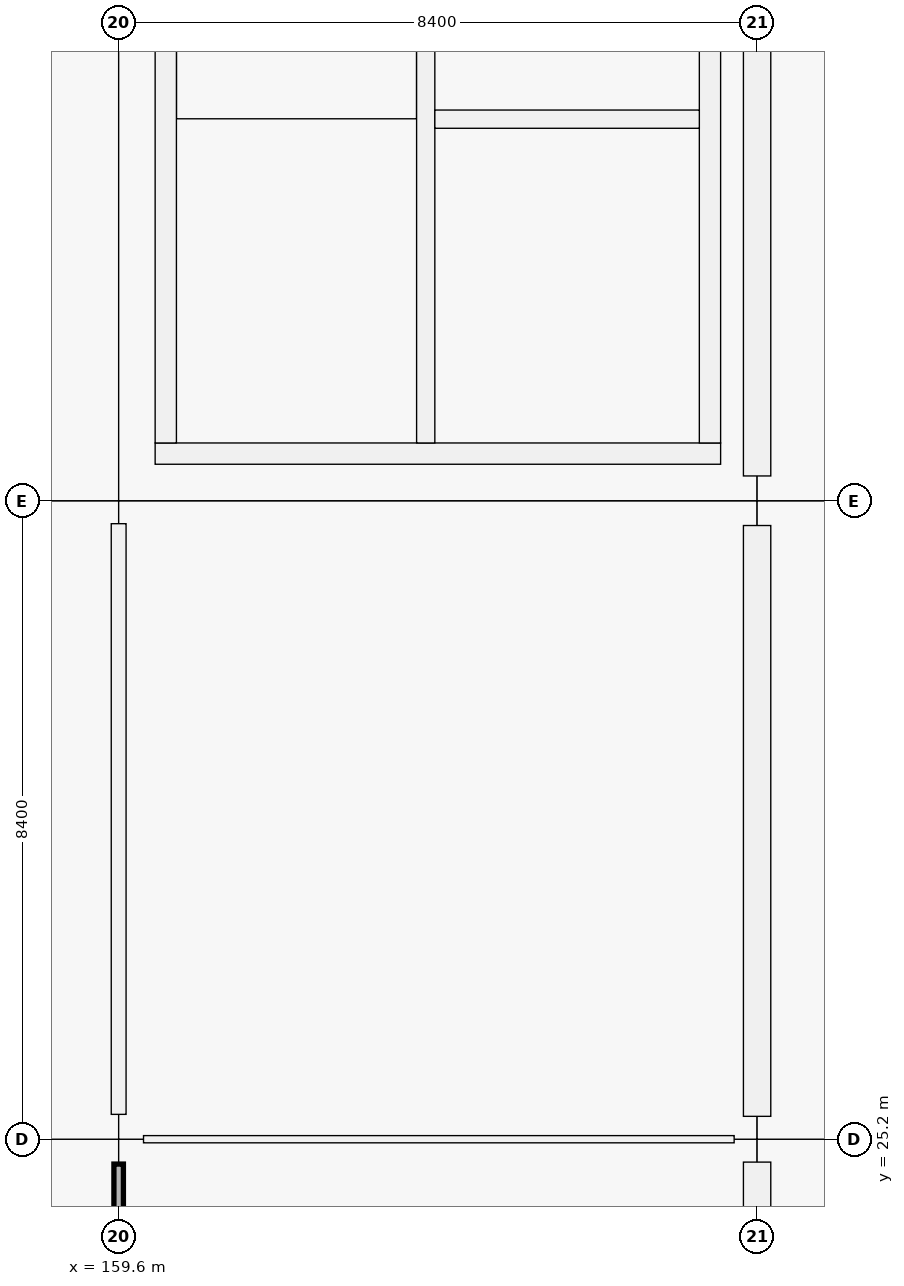
"""IFC4 building model, lengths in metres.
Left out: names, types, materials, properties, quantities, classifications, styles, units other than length and angle.
Written with IfcOpenShell. Run it as: python <this file> out.ifc"""

import sys

from ifc_helpers import new_model, si_unit, direction, frame, frame_2d, origin, origin_2d, place, context, subcontext, project, spatial, rectangle, extrude, element, fill, save


model = new_model("IFC4")
c1 = context("Model", 3, precision=1e-05, world=origin(), true_north=direction((0.0, 1.0)))
c2 = subcontext(c1, "Body", "Model", "MODEL_VIEW")
j1 = project(units=[si_unit("LENGTHUNIT", "METRE"), si_unit("PLANEANGLEUNIT", "RADIAN")], contexts=[c1])
p1 = place(None, origin())
s1 = spatial("IfcSite", under=j1, at=p1, CompositionType="ELEMENT")
p2 = place(p1, origin())
s2 = spatial("IfcBuilding", under=s1, at=p2, CompositionType="ELEMENT")
p3 = place(p2, frame((0.0, 0.0, 10.26)))
s3 = spatial("IfcBuildingStorey", under=s2, at=p3, CompositionType="ELEMENT", Elevation=10.26)
p4 = place(p3, frame((159.6, 25.2, 0.0), z_axis=(0.0, 0.0, 1.0), x_axis=(1.0, 0.0, 0.0)))
e1 = element("IfcColumn", 1, at=p4, inside=s3, PredefinedType="COLUMN", context=c2, shape_type="SweptSolid", body=[
    extrude(rectangle(XDim=0.65, YDim=0.65, at=origin_2d()), origin(), (0.0, 0.0, 1.0), 4.5),
])
for number, where, z_axis, x_axis in (
    (2, (159.6, 33.6, 0.0), (0.0, 0.0, 1.0), (1.0, 0.0, 0.0)),
    (3, (168.0, 25.2, 0.0), (0.0, 0.0, 1.0), (1.0, 0.0, 0.0)),
):
    element("IfcColumn", number, at=place(p3, frame(where, z_axis=z_axis, x_axis=x_axis)), inside=s3, PredefinedType="COLUMN", context=c2, shape_type="SweptSolid", body=[
        extrude(rectangle(XDim=0.6, YDim=0.6, at=origin_2d()), origin(), (0.0, 0.0, 1.0), 4.5),
    ])
p5 = place(p3, frame((168.0, 33.6, 0.0), z_axis=(0.0, 0.0, 1.0), x_axis=(1.0, 0.0, 0.0)))
e4 = element("IfcColumn", 4, at=p5, inside=s3, PredefinedType="COLUMN", context=c2, shape_type="SweptSolid", body=[
    extrude(rectangle(XDim=0.65, YDim=0.65, at=origin_2d()), origin(), (0.0, 0.0, 1.0), 4.5),
])
p6 = place(p3, frame((168.0, 24.899, 0.0), z_axis=(0.0, 0.0, 1.0), x_axis=(0.0, -1.0, 0.0)))
e5 = element("IfcWall", 5, at=p6, inside=s3, PredefinedType="SOLIDWALL", context=c2, shape_type="SweptSolid", body=[
    extrude(rectangle(XDim=7.773, YDim=0.36, at=frame_2d((3.886, 0.0))), origin(), (0.0, 0.0, 1.0), 3.54),
])
p7 = place(p6, frame((3.087, 0.0, 0.9)))
e6 = element("IfcOpeningElement", 6, at=p7, cuts=e5, PredefinedType="OPENING", context=c2, shape_type="SweptSolid", body=[
    extrude(rectangle(XDim=1.6, YDim=2.1, at=frame_2d((0.8, 1.05))), frame((0.0, 0.18, 0.0), z_axis=(0.0, -1.0, 0.0), x_axis=(1.0, 0.0, 0.0)), (0.0, 0.0, 1.0), 0.36),
])
p8 = place(p3, frame((168.0, 33.274, 0.0), z_axis=(0.0, 0.0, 1.0), x_axis=(0.0, -1.0, 0.0)))
e7 = element("IfcWall", 7, at=p8, inside=s3, PredefinedType="SOLIDWALL", context=c2, shape_type="SweptSolid", body=[
    extrude(rectangle(XDim=7.773, YDim=0.36, at=frame_2d((3.886, 0.0))), origin(), (0.0, 0.0, 1.0), 3.54),
])
p9 = place(p8, frame((2.886, 0.0, 0.9)))
e8 = element("IfcOpeningElement", 8, at=p9, cuts=e7, PredefinedType="OPENING", context=c2, shape_type="SweptSolid", body=[
    extrude(rectangle(XDim=2.0, YDim=2.1, at=frame_2d((1.0, 1.05))), frame((0.0, 0.18, 0.0), z_axis=(0.0, -1.0, 0.0), x_axis=(1.0, 0.0, 0.0)), (0.0, 0.0, 1.0), 0.36),
])
p10 = place(p3, frame((168.0, 41.699, 0.0), z_axis=(0.0, 0.0, 1.0), x_axis=(0.0, -1.0, 0.0)))
e9 = element("IfcWall", 9, at=p10, inside=s3, PredefinedType="SOLIDWALL", context=c2, shape_type="SweptSolid", body=[
    extrude(rectangle(XDim=7.773, YDim=0.36, at=frame_2d((3.886, 0.0))), origin(), (0.0, 0.0, 1.0), 3.54),
])
p11 = place(p3, frame((167.52, 34.22, 0.0), z_axis=(0.0, 0.0, 1.0), x_axis=(-1.0, 0.0, 0.0)))
e10 = element("IfcWall", 10, at=p11, inside=s3, PredefinedType="SHEAR", context=c2, shape_type="SweptSolid", body=[
    extrude(rectangle(XDim=7.44, YDim=0.28, at=frame_2d((3.72, 0.0))), origin(), (0.0, 0.0, 1.0), 4.5),
])
p12 = place(p11, frame((1.28, 0.0, 0.0)))
e11 = element("IfcOpeningElement", 11, at=p12, cuts=e10, PredefinedType="OPENING", context=c2, shape_type="SweptSolid", body=[
    extrude(rectangle(XDim=1.5, YDim=2.15, at=frame_2d((0.75, 1.075))), frame((0.0, 0.14, 0.0), z_axis=(0.0, -1.0, 0.0), x_axis=(1.0, 0.0, 0.0)), (0.0, 0.0, 1.0), 0.28),
])
for number, where, z_axis, x_axis in (
    (12, (160.22, 34.36, 0.0), (0.0, 0.0, 1.0), (0.0, 1.0, 0.0)),
    (13, (167.38, 41.24, 0.0), (0.0, 0.0, 1.0), (0.0, -1.0, 0.0)),
):
    element("IfcWall", number, at=place(p3, frame(where, z_axis=z_axis, x_axis=x_axis)), inside=s3, PredefinedType="SHEAR", context=c2, shape_type="SweptSolid", body=[
        extrude(rectangle(XDim=6.88, YDim=0.28, at=frame_2d((3.44, 0.0))), origin(), (0.0, 0.0, 1.0), 4.5),
    ])
p13 = place(p3, frame((163.64, 34.36, 0.0), z_axis=(0.0, 0.0, 1.0), x_axis=(0.0, 1.0, 0.0)))
e14 = element("IfcWall", 14, at=p13, inside=s3, PredefinedType="SHEAR", context=c2, shape_type="SweptSolid", body=[
    extrude(rectangle(XDim=6.88, YDim=0.24, at=frame_2d((3.44, 0.0))), origin(), (0.0, 0.0, 1.0), 4.5),
])
p14 = place(p13, frame((0.12, 0.0, 0.0)))
e15 = element("IfcOpeningElement", 15, at=p14, cuts=e14, PredefinedType="OPENING", context=c2, shape_type="SweptSolid", body=[
    extrude(rectangle(XDim=1.0, YDim=2.15, at=frame_2d((0.5, 1.075))), frame((0.0, 0.12, 0.0), z_axis=(0.0, -1.0, 0.0), x_axis=(1.0, 0.0, 0.0)), (0.0, 0.0, 1.0), 0.24),
])
p15 = place(p3, frame((163.76, 38.62, 0.0), z_axis=(0.0, 0.0, 1.0), x_axis=(1.0, 0.0, 0.0)))
e16 = element("IfcWall", 16, at=p15, inside=s3, PredefinedType="SHEAR", context=c2, shape_type="SweptSolid", body=[
    extrude(rectangle(XDim=3.48, YDim=0.24, at=frame_2d((1.74, 0.0))), origin(), (0.0, 0.0, 1.0), 4.5),
])
p16 = place(p15, frame((1.09, 0.0, 0.0)))
e17 = element("IfcOpeningElement", 17, at=p16, cuts=e16, PredefinedType="OPENING", context=c2, shape_type="SweptSolid", body=[
    extrude(rectangle(XDim=1.3, YDim=2.25, at=frame_2d((0.65, 1.125))), frame((0.0, 0.12, 0.0), z_axis=(0.0, -1.0, 0.0), x_axis=(1.0, 0.0, 0.0)), (0.0, 0.0, 1.0), 0.24),
])
p17 = place(p3, frame((159.927, 25.2, 0.0), z_axis=(0.0, 0.0, 1.0), x_axis=(1.0, 0.0, 0.0)))
e18 = element("IfcWall", 18, at=p17, inside=s3, PredefinedType="PARTITIONING", context=c2, shape_type="SweptSolid", body=[
    extrude(rectangle(XDim=7.771, YDim=0.095, at=frame_2d((3.885, 0.0))), origin(), (0.0, 0.0, 1.0), 3.37),
])
p18 = place(p17, frame((3.401, 0.0, 0.0)))
e19 = element("IfcOpeningElement", 19, at=p18, cuts=e18, PredefinedType="OPENING", context=c2, shape_type="SweptSolid", body=[
    extrude(rectangle(XDim=0.97, YDim=2.12, at=frame_2d((0.485, 1.06))), frame((0.0, 0.047, 0.0), z_axis=(0.0, -1.0, 0.0), x_axis=(1.0, 0.0, 0.0)), (0.0, 0.0, 1.0), 0.095),
])
p19 = place(p3, frame((159.6, 17.102, 0.0), z_axis=(0.0, 0.0, 1.0), x_axis=(0.0, 1.0, 0.0)))
e20 = element("IfcWall", 20, at=p19, inside=s3, PredefinedType="PARTITIONING", context=c2, shape_type="SweptSolid", body=[
    extrude(rectangle(XDim=7.771, YDim=0.125, at=frame_2d((3.885, 0.0))), origin(), (0.0, 0.0, 1.0), 3.37),
])
p20 = place(p19, frame((3.356, 0.0, 0.0)))
e21 = element("IfcOpeningElement", 21, at=p20, cuts=e20, PredefinedType="OPENING", context=c2, shape_type="SweptSolid", body=[
    extrude(rectangle(XDim=1.06, YDim=2.25, at=frame_2d((0.53, 1.125))), frame((0.0, 0.062, 0.0), z_axis=(0.0, -1.0, 0.0), x_axis=(1.0, 0.0, 0.0)), (0.0, 0.0, 1.0), 0.125),
])
p21 = place(p3, frame((159.6, 25.527, 0.0), z_axis=(0.0, 0.0, 1.0), x_axis=(0.0, 1.0, 0.0)))
e22 = element("IfcWall", 22, at=p21, inside=s3, PredefinedType="PARTITIONING", context=c2, shape_type="SweptSolid", body=[
    extrude(rectangle(XDim=7.771, YDim=0.195, at=frame_2d((3.885, 0.0))), origin(), (0.0, 0.0, 1.0), 3.37),
])
p22 = place(p21, frame((3.361, 0.0, 0.0)))
e23 = element("IfcOpeningElement", 23, at=p22, cuts=e22, PredefinedType="OPENING", context=c2, shape_type="SweptSolid", body=[
    extrude(rectangle(XDim=1.05, YDim=2.12, at=frame_2d((0.525, 1.06))), frame((0.0, 0.098, 0.0), z_axis=(0.0, -1.0, 0.0), x_axis=(1.0, 0.0, 0.0)), (0.0, 0.0, 1.0), 0.195),
])
p23 = place(p9, origin())
e24 = element("IfcWindow", 24, at=p23, inside=s3, PartitioningType="SINGLE_PANEL", PredefinedType="WINDOW", context=c2, shape_type="SweptSolid", body=[
    extrude(rectangle(XDim=2.0, YDim=2.1, at=frame_2d((1.0, 1.05))), frame((0.0, 0.03, 0.0), z_axis=(0.0, -1.0, 0.0), x_axis=(1.0, 0.0, 0.0)), (0.0, 0.0, 1.0), 0.06),
])
fill(e8, e24)
p24 = place(p14, origin())
e25 = element("IfcDoor", 25, at=p24, inside=s3, OperationType="SINGLE_SWING_RIGHT", PredefinedType="DOOR", context=c2, shape_type="SweptSolid", body=[
    extrude(rectangle(XDim=1.0, YDim=2.15, at=frame_2d((0.5, 1.075))), frame((0.0, 0.025, 0.0), z_axis=(0.0, -1.0, 0.0), x_axis=(1.0, 0.0, 0.0)), (0.0, 0.0, 1.0), 0.05),
])
fill(e15, e25)
p25 = place(p12, origin())
e26 = element("IfcDoor", 26, at=p25, inside=s3, OperationType="DOUBLE_DOOR_SINGLE_SWING", PredefinedType="DOOR", context=c2, shape_type="SweptSolid", body=[
    extrude(rectangle(XDim=1.5, YDim=2.15, at=frame_2d((0.75, 1.075))), frame((0.0, 0.025, 0.0), z_axis=(0.0, -1.0, 0.0), x_axis=(1.0, 0.0, 0.0)), (0.0, 0.0, 1.0), 0.05),
])
fill(e11, e26)
p26 = place(p16, origin())
e27 = element("IfcDoor", 27, at=p26, inside=s3, OperationType="DOUBLE_DOOR_SLIDING", PredefinedType="DOOR", context=c2, shape_type="SweptSolid", body=[
    extrude(rectangle(XDim=1.3, YDim=2.25, at=frame_2d((0.65, 1.125))), frame((0.0, 0.025, 0.0), z_axis=(0.0, -1.0, 0.0), x_axis=(1.0, 0.0, 0.0)), (0.0, 0.0, 1.0), 0.05),
])
fill(e17, e27)
p27 = place(p18, origin())
e28 = element("IfcDoor", 28, at=p27, inside=s3, OperationType="SINGLE_SWING_RIGHT", PredefinedType="DOOR", context=c2, shape_type="SweptSolid", body=[
    extrude(rectangle(XDim=0.97, YDim=2.12, at=frame_2d((0.485, 1.06))), frame((0.0, 0.025, 0.0), z_axis=(0.0, -1.0, 0.0), x_axis=(1.0, 0.0, 0.0)), (0.0, 0.0, 1.0), 0.05),
])
fill(e19, e28)
p28 = place(p22, origin())
e29 = element("IfcDoor", 29, at=p28, inside=s3, OperationType="SINGLE_SWING_RIGHT", PredefinedType="DOOR", context=c2, shape_type="SweptSolid", body=[
    extrude(rectangle(XDim=1.05, YDim=2.12, at=frame_2d((0.525, 1.06))), frame((0.0, 0.025, 0.0), z_axis=(0.0, -1.0, 0.0), x_axis=(1.0, 0.0, 0.0)), (0.0, 0.0, 1.0), 0.05),
])
fill(e23, e29)
save(model, sys.argv[1])
